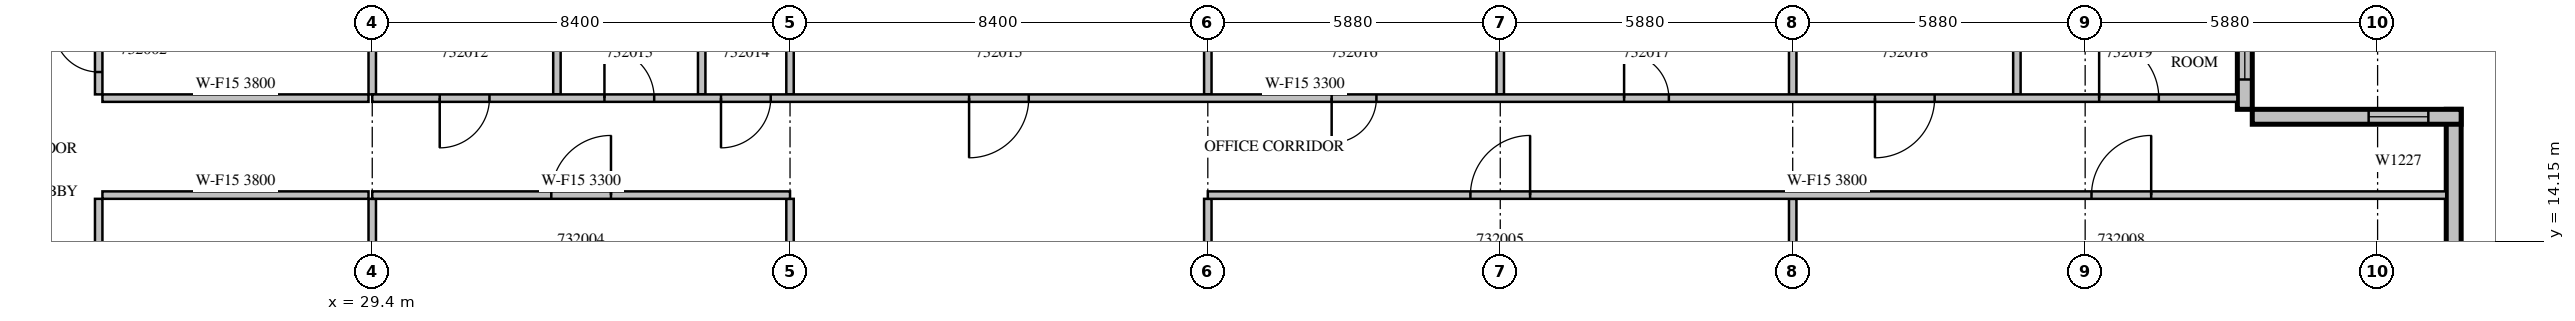
"""IFC4 building model, lengths in metres.
Left out: names, types, materials, properties, quantities, classifications, styles, units other than length and angle.
Written with IfcOpenShell. Run it as: python <this file> out.ifc"""

import sys

from ifc_helpers import new_model, si_unit, direction, frame, frame_2d, origin, place, context, subcontext, project, spatial, rectangle, extrude, source, transform, mapped, element, fill, save


model = new_model("IFC4")
c1 = context("Model", 3, precision=1e-05, world=origin(), true_north=direction((0.0, 1.0)))
c2 = subcontext(c1, "Body", "Model", "MODEL_VIEW")
j1 = project(units=[si_unit("LENGTHUNIT", "METRE"), si_unit("PLANEANGLEUNIT", "RADIAN")], contexts=[c1])
p1 = place(None, origin())
s1 = spatial("IfcSite", under=j1, at=p1, CompositionType="ELEMENT")
p2 = place(p1, origin())
s2 = spatial("IfcBuilding", under=s1, at=p2, CompositionType="ELEMENT")
p3 = place(p2, frame((0.0, 0.0, 145.5)))
s3 = spatial("IfcBuildingStorey", under=s2, at=p3, CompositionType="ELEMENT", Elevation=145.5)
m1 = source(origin(), c2, "Body", "SweptSolid", [
    extrude(rectangle(XDim=6.3, YDim=0.3, at=frame_2d((3.15, 0.0))), origin(), (0.0, 0.0, 1.0), 3.8),
])
p4 = place(p3, frame((71.25, 10.5, 0.0), z_axis=(0.0, 0.0, 1.0), x_axis=(0.0, 1.0, 0.0)))
e1 = element("IfcWall", 1, at=p4, inside=s3, PredefinedType="STANDARD", context=c2, shape_type="MappedRepresentation", body=[
    mapped(m1, transform((0.0, 0.0, 0.0), scale=1.0)),
])
m2 = source(origin(), c2, "Body", "SweptSolid", [
    extrude(rectangle(XDim=1.2, YDim=2.7, at=frame_2d((0.6, 1.35))), frame((0.0, 0.16, 0.0), z_axis=(0.0, -1.0, 0.0), x_axis=(1.0, 0.0, 0.0)), (0.0, 0.0, 1.0), 0.32),
])
p5 = place(p4, frame((1.025, 0.0, 0.6)))
e2 = element("IfcOpeningElement", 2, at=p5, cuts=e1, PredefinedType="OPENING", context=c2, shape_type="MappedRepresentation", body=[
    mapped(m2, transform((0.0, 0.0, 0.0), scale=1.0)),
])
m3 = source(origin(), c2, "Body", "SweptSolid", [
    extrude(rectangle(XDim=4.2, YDim=0.3, at=frame_2d((2.1, 0.0))), origin(), (0.0, 0.0, 1.0), 3.8),
])
p6 = place(p3, frame((71.4, 16.65, 0.0), z_axis=(0.0, 0.0, 1.0), x_axis=(-1.0, 0.0, 0.0)))
e3 = element("IfcWall", 3, at=p6, inside=s3, PredefinedType="STANDARD", context=c2, shape_type="MappedRepresentation", body=[
    mapped(m3, transform((0.0, 0.0, 0.0), scale=1.0)),
])
p7 = place(p6, frame((0.66, 0.0, 0.6)))
e4 = element("IfcOpeningElement", 4, at=p7, cuts=e3, PredefinedType="OPENING", context=c2, shape_type="MappedRepresentation", body=[
    mapped(m2, transform((0.0, 0.0, 0.0), scale=1.0)),
])
p8 = place(p3, frame((67.05, 16.8, 0.0), z_axis=(0.0, 0.0, 1.0), x_axis=(0.0, 1.0, 0.0)))
e5 = element("IfcWall", 5, at=p8, inside=s3, PredefinedType="STANDARD", context=c2, shape_type="MappedRepresentation", body=[
    mapped(m3, transform((0.0, 0.0, 0.0), scale=1.0)),
])
m4 = source(origin(), c2, "Body", "SweptSolid", [
    extrude(rectangle(XDim=3.0, YDim=2.7, at=frame_2d((1.5, 1.35))), frame((0.0, 0.16, 0.0), z_axis=(0.0, -1.0, 0.0), x_axis=(1.0, 0.0, 0.0)), (0.0, 0.0, 1.0), 0.32),
])
p9 = place(p8, frame((0.6, 0.0, 0.6)))
e6 = element("IfcOpeningElement", 6, at=p9, cuts=e5, PredefinedType="OPENING", context=c2, shape_type="MappedRepresentation", body=[
    mapped(m4, transform((0.0, 0.0, 0.0), scale=1.0)),
])
m5 = source(origin(), c2, "Body", "SweptSolid", [
    extrude(rectangle(XDim=4.295, YDim=0.15, at=frame_2d((2.147, 0.0))), origin(), (0.0, 0.0, 1.0), 3.8),
])
p10 = place(p3, frame((23.9, 15.0, 0.0), z_axis=(0.0, 0.0, 1.0), x_axis=(0.0, -1.0, 0.0)))
e7 = element("IfcWall", 7, at=p10, inside=s3, PredefinedType="PARTITIONING", context=c2, shape_type="MappedRepresentation", body=[
    mapped(m5, transform((0.0, 0.0, 0.0), scale=1.0)),
])
m6 = source(origin(), c2, "Body", "SweptSolid", [
    extrude(rectangle(XDim=0.9, YDim=2.1, at=frame_2d((0.45, 1.05))), frame((0.0, 0.085, 0.0), z_axis=(0.0, -1.0, 0.0), x_axis=(1.0, 0.0, 0.0)), (0.0, 0.0, 1.0), 0.17),
])
p11 = place(p10, frame((1.113, 0.0, 0.0)))
e8 = element("IfcOpeningElement", 8, at=p11, cuts=e7, PredefinedType="OPENING", context=c2, shape_type="MappedRepresentation", body=[
    mapped(m6, transform((0.0, 0.0, 0.0), scale=1.0)),
])
m7 = source(origin(), c2, "Body", "SweptSolid", [
    extrude(rectangle(XDim=3.6, YDim=0.15, at=frame_2d((1.8, 0.0))), origin(), (0.0, 0.0, 1.0), 3.8),
])
p12 = place(p3, frame((23.9, 20.7, 0.0), z_axis=(0.0, 0.0, 1.0), x_axis=(0.0, -1.0, 0.0)))
e9 = element("IfcWall", 9, at=p12, inside=s3, PredefinedType="PARTITIONING", context=c2, shape_type="MappedRepresentation", body=[
    mapped(m7, transform((0.0, 0.0, 0.0), scale=1.0)),
])
p13 = place(p12, frame((2.25, 0.0, 0.0)))
e10 = element("IfcOpeningElement", 10, at=p13, cuts=e9, PredefinedType="OPENING", context=c2, shape_type="MappedRepresentation", body=[
    mapped(m6, transform((0.0, 0.0, 0.0), scale=1.0)),
])
m8 = source(origin(), c2, "Body", "SweptSolid", [
    extrude(rectangle(XDim=5.35, YDim=0.15, at=frame_2d((2.675, 0.0))), origin(), (0.0, 0.0, 1.0), 3.8),
])
for number, where, z_axis, x_axis in (
    (11, (29.325, 15.075, 0.0), (0.0, 0.0, 1.0), (-1.0, 0.0, 0.0)),
    (12, (23.975, 17.025, 0.0), (0.0, 0.0, 1.0), (1.0, 0.0, 0.0)),
):
    element("IfcWall", number, at=place(p3, frame(where, z_axis=z_axis, x_axis=x_axis)), inside=s3, PredefinedType="PARTITIONING", context=c2, shape_type="MappedRepresentation", body=[
        mapped(m8, transform((0.0, 0.0, 0.0), scale=1.0)),
    ])
m9 = source(origin(), c2, "Body", "SweptSolid", [
    extrude(rectangle(XDim=3.976, YDim=0.15, at=frame_2d((1.988, 0.0))), origin(), (0.0, 0.0, 1.0), 3.8),
])
p14 = place(p3, frame((29.4, 11.024, 0.0), z_axis=(0.0, 0.0, 1.0), x_axis=(0.0, 1.0, 0.0)))
e13 = element("IfcWall", 13, at=p14, inside=s3, PredefinedType="PARTITIONING", context=c2, shape_type="MappedRepresentation", body=[
    mapped(m9, transform((0.0, 0.0, 0.0), scale=1.0)),
])
m10 = source(origin(), c2, "Body", "SweptSolid", [
    extrude(rectangle(XDim=2.851, YDim=0.15, at=frame_2d((1.425, 0.0))), origin(), (0.0, 0.0, 1.0), 3.8),
])
p15 = place(p3, frame((29.4, 17.1, 0.0), z_axis=(0.0, 0.0, 1.0), x_axis=(0.0, 1.0, 0.0)))
e14 = element("IfcWall", 14, at=p15, inside=s3, PredefinedType="PARTITIONING", context=c2, shape_type="MappedRepresentation", body=[
    mapped(m10, transform((0.0, 0.0, 0.0), scale=1.0)),
])
p16 = place(p3, frame((37.8, 11.024, 0.0), z_axis=(0.0, 0.0, 1.0), x_axis=(0.0, 1.0, 0.0)))
e15 = element("IfcWall", 15, at=p16, inside=s3, PredefinedType="PARTITIONING", context=c2, shape_type="MappedRepresentation", body=[
    mapped(m9, transform((0.0, 0.0, 0.0), scale=1.0)),
])
m11 = source(origin(), c2, "Body", "SweptSolid", [
    extrude(rectangle(XDim=3.825, YDim=0.15, at=frame_2d((1.913, 0.0))), origin(), (0.0, 0.0, 1.0), 3.8),
])
for number, where, z_axis, x_axis in (
    (16, (46.2, 11.175, 0.0), (0.0, 0.0, 1.0), (0.0, 1.0, 0.0)),
    (17, (57.96, 11.175, 0.0), (0.0, 0.0, 1.0), (0.0, 1.0, 0.0)),
):
    element("IfcWall", number, at=place(p3, frame(where, z_axis=z_axis, x_axis=x_axis)), inside=s3, PredefinedType="PARTITIONING", context=c2, shape_type="MappedRepresentation", body=[
        mapped(m11, transform((0.0, 0.0, 0.0), scale=1.0)),
    ])
m12 = source(origin(), c2, "Body", "SweptSolid", [
    extrude(rectangle(XDim=3.6, YDim=0.15, at=frame_2d((1.8, 0.0))), origin(), (0.0, 0.0, 1.0), 2.8),
])
for number, where, z_axis, x_axis in (
    (18, (33.113, 20.7, 0.0), (0.0, 0.0, 1.0), (0.0, -1.0, 0.0)),
    (19, (36.024, 20.7, 0.0), (0.0, 0.0, 1.0), (0.0, -1.0, 0.0)),
):
    element("IfcWall", number, at=place(p3, frame(where, z_axis=z_axis, x_axis=x_axis)), inside=s3, PredefinedType="PARTITIONING", context=c2, shape_type="MappedRepresentation", body=[
        mapped(m12, transform((0.0, 0.0, 0.0), scale=1.0)),
    ])
p17 = place(p3, frame((52.08, 19.951, 0.0), z_axis=(0.0, 0.0, 1.0), x_axis=(0.0, -1.0, 0.0)))
e20 = element("IfcWall", 20, at=p17, inside=s3, PredefinedType="PARTITIONING", context=c2, shape_type="MappedRepresentation", body=[
    mapped(m10, transform((0.0, 0.0, 0.0), scale=1.0)),
])
p18 = place(p3, frame((62.468, 20.7, 0.0), z_axis=(0.0, 0.0, 1.0), x_axis=(0.0, -1.0, 0.0)))
e21 = element("IfcWall", 21, at=p18, inside=s3, PredefinedType="PARTITIONING", context=c2, shape_type="MappedRepresentation", body=[
    mapped(m7, transform((0.0, 0.0, 0.0), scale=1.0)),
])
for number, where, z_axis, x_axis in (
    (22, (37.8, 17.1, 0.0), (0.0, 0.0, 1.0), (0.0, 1.0, 0.0)),
    (23, (46.2, 17.1, 0.0), (0.0, 0.0, 1.0), (0.0, 1.0, 0.0)),
    (24, (57.96, 17.1, 0.0), (0.0, 0.0, 1.0), (0.0, 1.0, 0.0)),
):
    element("IfcWall", number, at=place(p3, frame(where, z_axis=z_axis, x_axis=x_axis)), inside=s3, PredefinedType="PARTITIONING", context=c2, shape_type="MappedRepresentation", body=[
        mapped(m10, transform((0.0, 0.0, 0.0), scale=1.0)),
    ])
m13 = source(origin(), c2, "Body", "SweptSolid", [
    extrude(rectangle(XDim=8.4, YDim=0.15, at=frame_2d((4.2, 0.0))), origin(), (0.0, 0.0, 1.0), 3.3),
])
p19 = place(p3, frame((37.8, 15.075, 0.0), z_axis=(0.0, 0.0, 1.0), x_axis=(-1.0, 0.0, 0.0)))
e25 = element("IfcWall", 25, at=p19, inside=s3, PredefinedType="PARTITIONING", context=c2, shape_type="MappedRepresentation", body=[
    mapped(m13, transform((0.0, 0.0, 0.0), scale=1.0)),
])
m14 = source(origin(), c2, "Body", "SweptSolid", [
    extrude(rectangle(XDim=1.2, YDim=2.1, at=frame_2d((0.6, 1.05))), frame((0.0, 0.085, 0.0), z_axis=(0.0, -1.0, 0.0), x_axis=(1.0, 0.0, 0.0)), (0.0, 0.0, 1.0), 0.17),
])
p20 = place(p19, frame((3.6, 0.0, 0.0)))
e26 = element("IfcOpeningElement", 26, at=p20, cuts=e25, PredefinedType="OPENING", context=c2, shape_type="MappedRepresentation", body=[
    mapped(m14, transform((0.0, 0.0, 0.0), scale=1.0)),
])
m15 = source(origin(), c2, "Body", "SweptSolid", [
    extrude(rectangle(XDim=24.9, YDim=0.15, at=frame_2d((12.45, 0.0))), origin(), (0.0, 0.0, 1.0), 3.8),
])
p21 = place(p3, frame((71.1, 15.075, 0.0), z_axis=(0.0, 0.0, 1.0), x_axis=(-1.0, 0.0, 0.0)))
e27 = element("IfcWall", 27, at=p21, inside=s3, PredefinedType="PARTITIONING", context=c2, shape_type="MappedRepresentation", body=[
    mapped(m15, transform((0.0, 0.0, 0.0), scale=1.0)),
])
p22 = place(p21, frame((18.42, 0.0, 0.0)))
e28 = element("IfcOpeningElement", 28, at=p22, cuts=e27, PredefinedType="OPENING", context=c2, shape_type="MappedRepresentation", body=[
    mapped(m14, transform((0.0, 0.0, 0.0), scale=1.0)),
])
p23 = place(p21, frame((5.933, 0.0, 0.0)))
e29 = element("IfcOpeningElement", 29, at=p23, cuts=e27, PredefinedType="OPENING", context=c2, shape_type="MappedRepresentation", body=[
    mapped(m14, transform((0.0, 0.0, 0.0), scale=1.0)),
])
m16 = source(origin(), c2, "Body", "SweptSolid", [
    extrude(rectangle(XDim=37.5, YDim=0.15, at=frame_2d((18.75, 0.0))), origin(), (0.0, 0.0, 1.0), 3.3),
])
p24 = place(p3, frame((29.4, 17.025, 0.0), z_axis=(0.0, 0.0, 1.0), x_axis=(1.0, 0.0, 0.0)))
e30 = element("IfcWall", 30, at=p24, inside=s3, PredefinedType="PARTITIONING", context=c2, shape_type="MappedRepresentation", body=[
    mapped(m16, transform((0.0, 0.0, 0.0), scale=1.0)),
])
m17 = source(origin(), c2, "Body", "SweptSolid", [
    extrude(rectangle(XDim=1.0, YDim=2.1, at=frame_2d((0.5, 1.05))), frame((0.0, 0.085, 0.0), z_axis=(0.0, -1.0, 0.0), x_axis=(1.0, 0.0, 0.0)), (0.0, 0.0, 1.0), 0.17),
])
p25 = place(p24, frame((1.357, 0.0, 0.0)))
e31 = element("IfcOpeningElement", 31, at=p25, cuts=e30, PredefinedType="OPENING", context=c2, shape_type="MappedRepresentation", body=[
    mapped(m17, transform((0.0, 0.0, 0.0), scale=1.0)),
])
p26 = place(p24, frame((4.669, 0.0, 0.0)))
e32 = element("IfcOpeningElement", 32, at=p26, cuts=e30, PredefinedType="OPENING", context=c2, shape_type="MappedRepresentation", body=[
    mapped(m17, transform((0.0, 0.0, 0.0), scale=1.0)),
])
p27 = place(p24, frame((7.012, 0.0, 0.0)))
e33 = element("IfcOpeningElement", 33, at=p27, cuts=e30, PredefinedType="OPENING", context=c2, shape_type="MappedRepresentation", body=[
    mapped(m17, transform((0.0, 0.0, 0.0), scale=1.0)),
])
p28 = place(p24, frame((12.0, 0.0, 0.0)))
e34 = element("IfcOpeningElement", 34, at=p28, cuts=e30, PredefinedType="OPENING", context=c2, shape_type="MappedRepresentation", body=[
    mapped(m14, transform((0.0, 0.0, 0.0), scale=1.0)),
])
p29 = place(p24, frame((19.29, 0.0, 0.0)))
e35 = element("IfcOpeningElement", 35, at=p29, cuts=e30, PredefinedType="OPENING", context=c2, shape_type="MappedRepresentation", body=[
    mapped(m6, transform((0.0, 0.0, 0.0), scale=1.0)),
])
p30 = place(p24, frame((25.17, 0.0, 0.0)))
e36 = element("IfcOpeningElement", 36, at=p30, cuts=e30, PredefinedType="OPENING", context=c2, shape_type="MappedRepresentation", body=[
    mapped(m6, transform((0.0, 0.0, 0.0), scale=1.0)),
])
p31 = place(p24, frame((30.214, 0.0, 0.0)))
e37 = element("IfcOpeningElement", 37, at=p31, cuts=e30, PredefinedType="OPENING", context=c2, shape_type="MappedRepresentation", body=[
    mapped(m14, transform((0.0, 0.0, 0.0), scale=1.0)),
])
p32 = place(p24, frame((34.721, 0.0, 0.0)))
e38 = element("IfcOpeningElement", 38, at=p32, cuts=e30, PredefinedType="OPENING", context=c2, shape_type="MappedRepresentation", body=[
    mapped(m14, transform((0.0, 0.0, 0.0), scale=1.0)),
])
m18 = source(origin(), c2, "Body", "SweptSolid", [
    extrude(rectangle(XDim=1.2, YDim=2.7, at=frame_2d((0.6, 1.35))), frame((0.0, 0.03, 0.0), z_axis=(0.0, -1.0, 0.0), x_axis=(1.0, 0.0, 0.0)), (0.0, 0.0, 1.0), 0.06),
])
p33 = place(p7, origin())
e39 = element("IfcWindow", 39, at=p33, inside=s3, PartitioningType="SINGLE_PANEL", PredefinedType="WINDOW", context=c2, shape_type="MappedRepresentation", body=[
    mapped(m18, transform((0.0, 0.0, 0.0), scale=1.0)),
])
fill(e4, e39)
m19 = source(origin(), c2, "Body", "SweptSolid", [
    extrude(rectangle(XDim=3.0, YDim=2.7, at=frame_2d((1.5, 1.35))), frame((0.0, 0.03, 0.0), z_axis=(0.0, -1.0, 0.0), x_axis=(1.0, 0.0, 0.0)), (0.0, 0.0, 1.0), 0.06),
])
p34 = place(p9, origin())
e40 = element("IfcWindow", 40, at=p34, inside=s3, PartitioningType="SINGLE_PANEL", PredefinedType="WINDOW", context=c2, shape_type="MappedRepresentation", body=[
    mapped(m19, transform((0.0, 0.0, 0.0), scale=1.0)),
])
fill(e6, e40)
m20 = source(origin(), c2, "Body", "SweptSolid", [
    extrude(rectangle(XDim=0.9, YDim=2.1, at=frame_2d((0.45, 1.05))), frame((0.0, 0.025, 0.0), z_axis=(0.0, -1.0, 0.0), x_axis=(1.0, 0.0, 0.0)), (0.0, 0.0, 1.0), 0.05),
])
p35 = place(p13, origin())
e41 = element("IfcDoor", 41, at=p35, inside=s3, OperationType="SINGLE_SWING_RIGHT", PredefinedType="DOOR", context=c2, shape_type="MappedRepresentation", body=[
    mapped(m20, transform((0.0, 0.0, 0.0), scale=1.0)),
])
fill(e10, e41)
m21 = source(origin(), c2, "Body", "SweptSolid", [
    extrude(rectangle(XDim=1.2, YDim=2.1, at=frame_2d((0.6, 1.05))), frame((0.0, 0.025, 0.0), z_axis=(0.0, -1.0, 0.0), x_axis=(1.0, 0.0, 0.0)), (0.0, 0.0, 1.0), 0.05),
])
p36 = place(p20, origin())
e42 = element("IfcDoor", 42, at=p36, inside=s3, OperationType="SINGLE_SWING_RIGHT", PredefinedType="DOOR", context=c2, shape_type="MappedRepresentation", body=[
    mapped(m21, transform((0.0, 0.0, 0.0), scale=1.0)),
])
fill(e26, e42)
p37 = place(p22, origin())
e43 = element("IfcDoor", 43, at=p37, inside=s3, OperationType="SINGLE_SWING_RIGHT", PredefinedType="DOOR", context=c2, shape_type="MappedRepresentation", body=[
    mapped(m21, transform((0.0, 0.0, 0.0), scale=1.0)),
])
fill(e28, e43)
p38 = place(p23, origin())
e44 = element("IfcDoor", 44, at=p38, inside=s3, OperationType="SINGLE_SWING_RIGHT", PredefinedType="DOOR", context=c2, shape_type="MappedRepresentation", body=[
    mapped(m21, transform((0.0, 0.0, 0.0), scale=1.0)),
])
fill(e29, e44)
m22 = source(origin(), c2, "Body", "SweptSolid", [
    extrude(rectangle(XDim=1.0, YDim=2.1, at=frame_2d((0.5, 1.05))), frame((0.0, 0.025, 0.0), z_axis=(0.0, -1.0, 0.0), x_axis=(1.0, 0.0, 0.0)), (0.0, 0.0, 1.0), 0.05),
])
p39 = place(p25, origin())
e45 = element("IfcDoor", 45, at=p39, inside=s3, OperationType="SINGLE_SWING_RIGHT", PredefinedType="DOOR", context=c2, shape_type="MappedRepresentation", body=[
    mapped(m22, transform((0.0, 0.0, 0.0), scale=1.0)),
])
fill(e31, e45)
p40 = place(p26, origin())
e46 = element("IfcDoor", 46, at=p40, inside=s3, OperationType="SINGLE_SWING_LEFT", PredefinedType="DOOR", context=c2, shape_type="MappedRepresentation", body=[
    mapped(m22, transform((0.0, 0.0, 0.0), scale=1.0)),
])
fill(e32, e46)
p41 = place(p27, origin())
e47 = element("IfcDoor", 47, at=p41, inside=s3, OperationType="SINGLE_SWING_RIGHT", PredefinedType="DOOR", context=c2, shape_type="MappedRepresentation", body=[
    mapped(m22, transform((0.0, 0.0, 0.0), scale=1.0)),
])
fill(e33, e47)
p42 = place(p28, origin())
e48 = element("IfcDoor", 48, at=p42, inside=s3, OperationType="SINGLE_SWING_RIGHT", PredefinedType="DOOR", context=c2, shape_type="MappedRepresentation", body=[
    mapped(m21, transform((0.0, 0.0, 0.0), scale=1.0)),
])
fill(e34, e48)
p43 = place(p29, origin())
e49 = element("IfcDoor", 49, at=p43, inside=s3, OperationType="SINGLE_SWING_RIGHT", PredefinedType="DOOR", context=c2, shape_type="MappedRepresentation", body=[
    mapped(m20, transform((0.0, 0.0, 0.0), scale=1.0)),
])
fill(e35, e49)
p44 = place(p30, origin())
e50 = element("IfcDoor", 50, at=p44, inside=s3, OperationType="SINGLE_SWING_LEFT", PredefinedType="DOOR", context=c2, shape_type="MappedRepresentation", body=[
    mapped(m20, transform((0.0, 0.0, 0.0), scale=1.0)),
])
fill(e36, e50)
p45 = place(p31, origin())
e51 = element("IfcDoor", 51, at=p45, inside=s3, OperationType="SINGLE_SWING_RIGHT", PredefinedType="DOOR", context=c2, shape_type="MappedRepresentation", body=[
    mapped(m21, transform((0.0, 0.0, 0.0), scale=1.0)),
])
fill(e37, e51)
p46 = place(p32, origin())
e52 = element("IfcDoor", 52, at=p46, inside=s3, OperationType="SINGLE_SWING_LEFT", PredefinedType="DOOR", context=c2, shape_type="MappedRepresentation", body=[
    mapped(m21, transform((0.0, 0.0, 0.0), scale=1.0)),
])
fill(e38, e52)
save(model, sys.argv[1])
